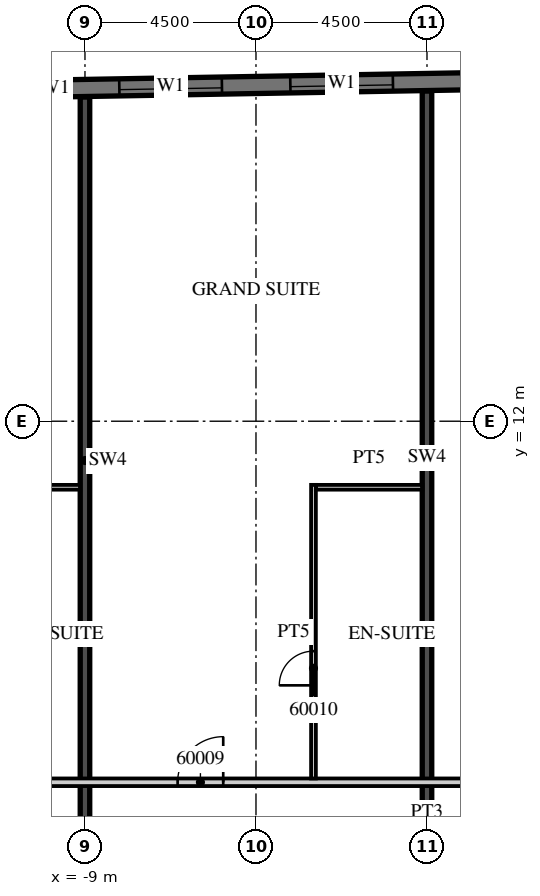
"""IFC4 building model, lengths in metres.
Left out: names, types, materials, properties, quantities, classifications, styles, units other than length and angle.
Written with IfcOpenShell. Run it as: python <this file> out.ifc"""

import sys

from ifc_helpers import new_model, si_unit, direction, frame, frame_2d, origin, place, context, subcontext, project, spatial, rectangle, extrude, element, fill, save


model = new_model("IFC4")
c1 = context("Model", 3, precision=1e-05, world=origin(), true_north=direction((0.0, 1.0)))
c2 = subcontext(c1, "Body", "Model", "MODEL_VIEW")
j1 = project(units=[si_unit("LENGTHUNIT", "METRE"), si_unit("PLANEANGLEUNIT", "RADIAN")], contexts=[c1])
p1 = place(None, origin())
s1 = spatial("IfcSite", under=j1, at=p1, CompositionType="ELEMENT")
p2 = place(p1, origin())
s2 = spatial("IfcBuilding", under=s1, at=p2, CompositionType="ELEMENT")
p3 = place(p2, frame((0.0, 0.0, 244.1)))
s3 = spatial("IfcBuildingStorey", under=s2, at=p3, CompositionType="ELEMENT", Elevation=244.1)
p4 = place(p3, frame((-9.0, 1.4, 0.0), z_axis=(0.0, 0.0, 1.0), x_axis=(0.0, 1.0, 0.0)))
e1 = element("IfcWall", 1, at=p4, inside=s3, PredefinedType="SHEAR", context=c2, shape_type="SweptSolid", body=[
    extrude(rectangle(XDim=19.132, YDim=0.25, at=frame_2d((9.566, 0.0))), origin(), (0.0, 0.0, 1.0), 3.3),
])
p5 = place(p3, frame((0.0, 1.4, 0.0), z_axis=(0.0, 0.0, 1.0), x_axis=(0.0, 1.0, 0.0)))
e2 = element("IfcWall", 2, at=p5, inside=s3, PredefinedType="SHEAR", context=c2, shape_type="SweptSolid", body=[
    extrude(rectangle(XDim=19.289, YDim=0.25, at=frame_2d((9.644, 0.0))), origin(), (0.0, 0.0, 1.0), 3.3),
])
p6 = place(p3, frame((13.504, 21.161, 0.0), z_axis=(0.0, 0.0, 1.0), x_axis=(-0.999847763257, -0.017448504532, 0.0)))
e3 = element("IfcWall", 3, at=p6, inside=s3, PredefinedType="SOLIDWALL", context=c2, shape_type="SweptSolid", body=[
    extrude(rectangle(XDim=46.859, YDim=0.45, at=frame_2d((23.43, 0.0))), origin(), (0.0, 0.0, 1.0), 3.02),
])
p7 = place(p6, frame((0.9, 0.0, 0.45)))
e4 = element("IfcOpeningElement", 4, at=p7, cuts=e3, PredefinedType="OPENING", context=c2, shape_type="SweptSolid", body=[
    extrude(rectangle(XDim=2.7, YDim=2.25, at=frame_2d((1.35, 1.125))), frame((0.0, 0.235, 0.0), z_axis=(0.0, -1.0, 0.0), x_axis=(1.0, 0.0, 0.0)), (0.0, 0.0, 1.0), 0.47),
])
p8 = place(p6, frame((5.401, 0.0, 0.45)))
e5 = element("IfcOpeningElement", 5, at=p8, cuts=e3, PredefinedType="OPENING", context=c2, shape_type="SweptSolid", body=[
    extrude(rectangle(XDim=2.7, YDim=2.25, at=frame_2d((1.35, 1.125))), frame((0.0, 0.235, 0.0), z_axis=(0.0, -1.0, 0.0), x_axis=(1.0, 0.0, 0.0)), (0.0, 0.0, 1.0), 0.47),
])
p9 = place(p6, frame((9.902, 0.0, 0.45)))
e6 = element("IfcOpeningElement", 6, at=p9, cuts=e3, PredefinedType="OPENING", context=c2, shape_type="SweptSolid", body=[
    extrude(rectangle(XDim=2.7, YDim=2.25, at=frame_2d((1.35, 1.125))), frame((0.0, 0.235, 0.0), z_axis=(0.0, -1.0, 0.0), x_axis=(1.0, 0.0, 0.0)), (0.0, 0.0, 1.0), 0.47),
])
p10 = place(p6, frame((14.402, 0.0, 0.45)))
e7 = element("IfcOpeningElement", 7, at=p10, cuts=e3, PredefinedType="OPENING", context=c2, shape_type="SweptSolid", body=[
    extrude(rectangle(XDim=2.7, YDim=2.25, at=frame_2d((1.35, 1.125))), frame((0.0, 0.235, 0.0), z_axis=(0.0, -1.0, 0.0), x_axis=(1.0, 0.0, 0.0)), (0.0, 0.0, 1.0), 0.47),
])
p11 = place(p6, frame((18.903, 0.0, 0.45)))
e8 = element("IfcOpeningElement", 8, at=p11, cuts=e3, PredefinedType="OPENING", context=c2, shape_type="SweptSolid", body=[
    extrude(rectangle(XDim=2.7, YDim=2.25, at=frame_2d((1.35, 1.125))), frame((0.0, 0.235, 0.0), z_axis=(0.0, -1.0, 0.0), x_axis=(1.0, 0.0, 0.0)), (0.0, 0.0, 1.0), 0.47),
])
p12 = place(p6, frame((23.404, 0.0, 0.45)))
e9 = element("IfcOpeningElement", 9, at=p12, cuts=e3, PredefinedType="OPENING", context=c2, shape_type="SweptSolid", body=[
    extrude(rectangle(XDim=2.7, YDim=2.25, at=frame_2d((1.35, 1.125))), frame((0.0, 0.235, 0.0), z_axis=(0.0, -1.0, 0.0), x_axis=(1.0, 0.0, 0.0)), (0.0, 0.0, 1.0), 0.47),
])
p13 = place(p6, frame((27.904, 0.0, 0.45)))
e10 = element("IfcOpeningElement", 10, at=p13, cuts=e3, PredefinedType="OPENING", context=c2, shape_type="SweptSolid", body=[
    extrude(rectangle(XDim=2.7, YDim=2.25, at=frame_2d((1.35, 1.125))), frame((0.0, 0.235, 0.0), z_axis=(0.0, -1.0, 0.0), x_axis=(1.0, 0.0, 0.0)), (0.0, 0.0, 1.0), 0.47),
])
p14 = place(p6, frame((32.405, 0.0, 0.45)))
e11 = element("IfcOpeningElement", 11, at=p14, cuts=e3, PredefinedType="OPENING", context=c2, shape_type="SweptSolid", body=[
    extrude(rectangle(XDim=2.7, YDim=2.25, at=frame_2d((1.35, 1.125))), frame((0.0, 0.235, 0.0), z_axis=(0.0, -1.0, 0.0), x_axis=(1.0, 0.0, 0.0)), (0.0, 0.0, 1.0), 0.47),
])
p15 = place(p6, frame((36.906, 0.0, 0.45)))
e12 = element("IfcOpeningElement", 12, at=p15, cuts=e3, PredefinedType="OPENING", context=c2, shape_type="SweptSolid", body=[
    extrude(rectangle(XDim=2.7, YDim=2.25, at=frame_2d((1.35, 1.125))), frame((0.0, 0.235, 0.0), z_axis=(0.0, -1.0, 0.0), x_axis=(1.0, 0.0, 0.0)), (0.0, 0.0, 1.0), 0.47),
])
p16 = place(p6, frame((41.406, 0.0, 0.45)))
e13 = element("IfcOpeningElement", 13, at=p16, cuts=e3, PredefinedType="OPENING", context=c2, shape_type="SweptSolid", body=[
    extrude(rectangle(XDim=2.7, YDim=2.25, at=frame_2d((1.35, 1.125))), frame((0.0, 0.235, 0.0), z_axis=(0.0, -1.0, 0.0), x_axis=(1.0, 0.0, 0.0)), (0.0, 0.0, 1.0), 0.47),
])
p17 = place(p3, frame((-13.5, 2.5, 0.0), z_axis=(0.0, 0.0, 1.0), x_axis=(1.0, 0.0, 0.0)))
e14 = element("IfcWall", 14, at=p17, inside=s3, PredefinedType="PARTITIONING", context=c2, shape_type="SweptSolid", body=[
    extrude(rectangle(XDim=27.0, YDim=0.2, at=frame_2d((13.5, 0.0))), origin(), (0.0, 0.0, 1.0), 3.02),
])
p18 = place(p17, frame((0.575, 0.0, 0.0)))
e15 = element("IfcOpeningElement", 15, at=p18, cuts=e14, PredefinedType="OPENING", context=c2, shape_type="SweptSolid", body=[
    extrude(rectangle(XDim=1.0, YDim=2.1, at=frame_2d((0.5, 1.05))), frame((0.0, 0.11, 0.0), z_axis=(0.0, -1.0, 0.0), x_axis=(1.0, 0.0, 0.0)), (0.0, 0.0, 1.0), 0.22),
])
p19 = place(p17, frame((6.938, 0.0, 0.0)))
e16 = element("IfcOpeningElement", 16, at=p19, cuts=e14, PredefinedType="OPENING", context=c2, shape_type="SweptSolid", body=[
    extrude(rectangle(XDim=1.2, YDim=2.1, at=frame_2d((0.6, 1.05))), frame((0.0, 0.11, 0.0), z_axis=(0.0, -1.0, 0.0), x_axis=(1.0, 0.0, 0.0)), (0.0, 0.0, 1.0), 0.22),
])
p20 = place(p17, frame((15.938, 0.0, 0.0)))
e17 = element("IfcOpeningElement", 17, at=p20, cuts=e14, PredefinedType="OPENING", context=c2, shape_type="SweptSolid", body=[
    extrude(rectangle(XDim=1.2, YDim=2.1, at=frame_2d((0.6, 1.05))), frame((0.0, 0.11, 0.0), z_axis=(0.0, -1.0, 0.0), x_axis=(1.0, 0.0, 0.0)), (0.0, 0.0, 1.0), 0.22),
])
p21 = place(p17, frame((23.075, 0.0, 0.0)))
e18 = element("IfcOpeningElement", 18, at=p21, cuts=e14, PredefinedType="OPENING", context=c2, shape_type="SweptSolid", body=[
    extrude(rectangle(XDim=1.0, YDim=2.1, at=frame_2d((0.5, 1.05))), frame((0.0, 0.11, 0.0), z_axis=(0.0, -1.0, 0.0), x_axis=(1.0, 0.0, 0.0)), (0.0, 0.0, 1.0), 0.22),
])
p22 = place(p3, frame((-11.375, 10.262, 0.0), z_axis=(0.0, 0.0, 1.0), x_axis=(1.0, 0.0, 0.0)))
e19 = element("IfcWall", 19, at=p22, inside=s3, PredefinedType="PARTITIONING", context=c2, shape_type="SweptSolid", body=[
    extrude(rectangle(XDim=2.25, YDim=0.125, at=frame_2d((1.125, 0.0))), origin(), (0.0, 0.0, 1.0), 3.02),
])
p23 = place(p3, frame((-2.987, 2.6, 0.0), z_axis=(0.0, 0.0, 1.0), x_axis=(0.0, 1.0, 0.0)))
e20 = element("IfcWall", 20, at=p23, inside=s3, PredefinedType="PARTITIONING", context=c2, shape_type="SweptSolid", body=[
    extrude(rectangle(XDim=7.725, YDim=0.125, at=frame_2d((3.862, 0.0))), origin(), (0.0, 0.0, 1.0), 3.02),
])
p24 = place(p23, frame((2.45, 0.0, 0.0)))
e21 = element("IfcOpeningElement", 21, at=p24, cuts=e20, PredefinedType="OPENING", context=c2, shape_type="SweptSolid", body=[
    extrude(rectangle(XDim=0.9, YDim=2.1, at=frame_2d((0.45, 1.05))), frame((0.0, 0.073, 0.0), z_axis=(0.0, -1.0, 0.0), x_axis=(1.0, 0.0, 0.0)), (0.0, 0.0, 1.0), 0.145),
])
p25 = place(p3, frame((-2.925, 10.262, 0.0), z_axis=(0.0, 0.0, 1.0), x_axis=(1.0, 0.0, 0.0)))
e22 = element("IfcWall", 22, at=p25, inside=s3, PredefinedType="PARTITIONING", context=c2, shape_type="SweptSolid", body=[
    extrude(rectangle(XDim=2.8, YDim=0.125, at=frame_2d((1.4, 0.0))), origin(), (0.0, 0.0, 1.0), 3.02),
])
p26 = place(p10, origin())
e23 = element("IfcWindow", 23, at=p26, inside=s3, PartitioningType="SINGLE_PANEL", PredefinedType="WINDOW", context=c2, shape_type="SweptSolid", body=[
    extrude(rectangle(XDim=2.7, YDim=2.25, at=frame_2d((1.35, 1.125))), frame((0.0, 0.09, 0.0), z_axis=(0.0, -1.0, 0.0), x_axis=(1.0, 0.0, 0.0)), (0.0, 0.0, 1.0), 0.06),
])
fill(e7, e23)
p27 = place(p11, origin())
e24 = element("IfcWindow", 24, at=p27, inside=s3, PartitioningType="SINGLE_PANEL", PredefinedType="WINDOW", context=c2, shape_type="SweptSolid", body=[
    extrude(rectangle(XDim=2.7, YDim=2.25, at=frame_2d((1.35, 1.125))), frame((0.0, 0.09, 0.0), z_axis=(0.0, -1.0, 0.0), x_axis=(1.0, 0.0, 0.0)), (0.0, 0.0, 1.0), 0.06),
])
fill(e8, e24)
p28 = place(p19, origin())
e25 = element("IfcDoor", 25, at=p28, inside=s3, OperationType="SINGLE_SWING_RIGHT", PredefinedType="DOOR", context=c2, shape_type="SweptSolid", body=[
    extrude(rectangle(XDim=1.2, YDim=2.1, at=frame_2d((0.6, 1.05))), frame((0.0, 0.025, 0.0), z_axis=(0.0, -1.0, 0.0), x_axis=(1.0, 0.0, 0.0)), (0.0, 0.0, 1.0), 0.05),
])
fill(e16, e25)
p29 = place(p24, origin())
e26 = element("IfcDoor", 26, at=p29, inside=s3, OperationType="SINGLE_SWING_LEFT", PredefinedType="DOOR", context=c2, shape_type="SweptSolid", body=[
    extrude(rectangle(XDim=0.9, YDim=2.1, at=frame_2d((0.45, 1.05))), frame((0.0, 0.025, 0.0), z_axis=(0.0, -1.0, 0.0), x_axis=(1.0, 0.0, 0.0)), (0.0, 0.0, 1.0), 0.05),
])
fill(e21, e26)
save(model, sys.argv[1])
